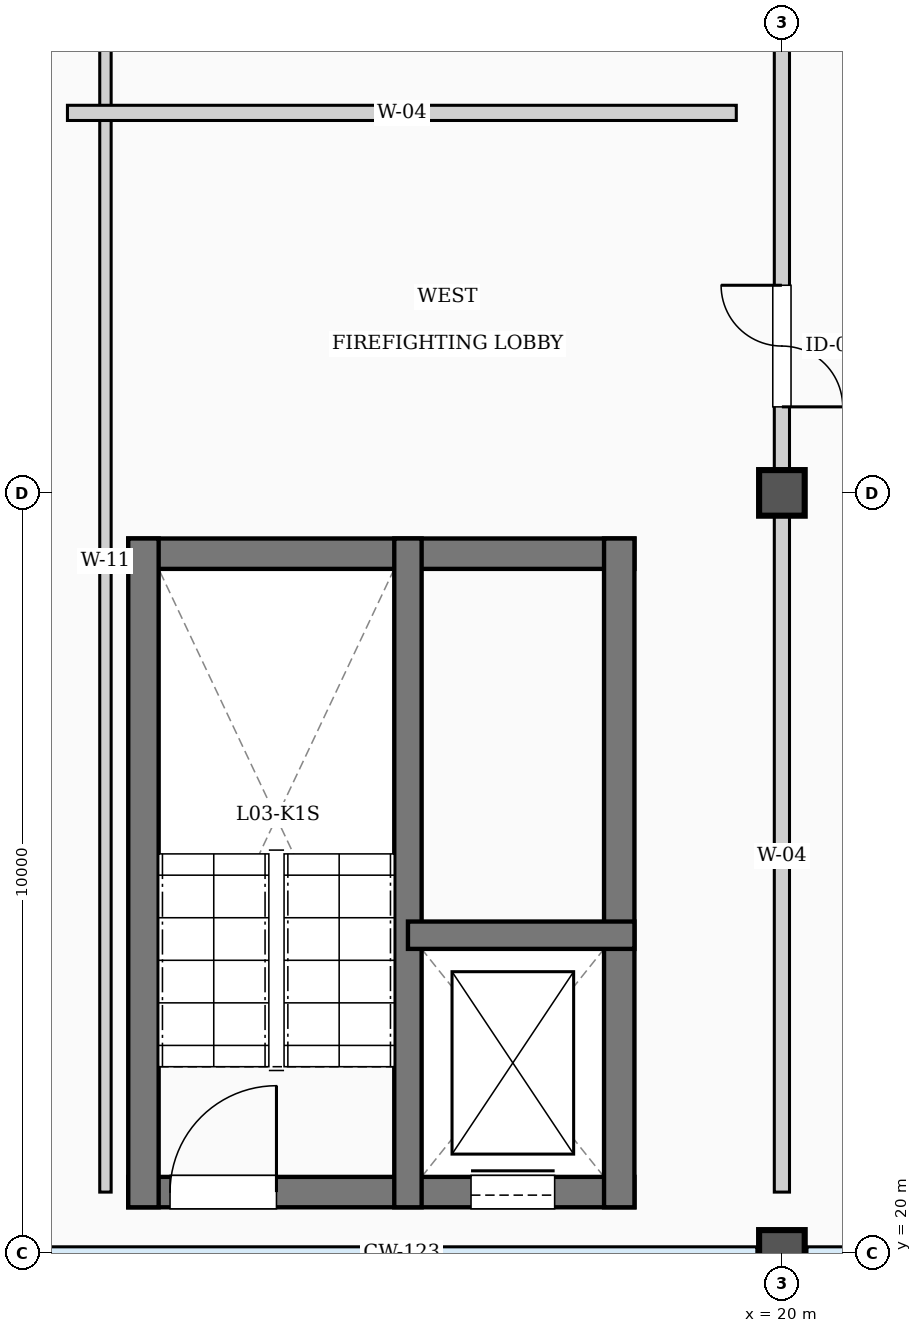
"""IFC4 building model, lengths in metres.
Left out: names, types, materials, properties, quantities, classifications, styles, units other than length and angle.
Written with IfcOpenShell. Run it as: python <this file> out.ifc"""

import sys

from ifc_helpers import new_model, si_unit, direction, frame, frame_2d, origin, origin_2d, place, context, subcontext, project, spatial, rectangle, extrude, element, fill, save


model = new_model("IFC4")
c1 = context("Model", 3, precision=1e-05, world=origin(), true_north=direction((0.0, 1.0)))
c2 = subcontext(c1, "Body", "Model", "MODEL_VIEW")
j1 = project(units=[si_unit("LENGTHUNIT", "METRE"), si_unit("PLANEANGLEUNIT", "RADIAN")], contexts=[c1])
p1 = place(None, origin())
s1 = spatial("IfcSite", under=j1, at=p1, CompositionType="ELEMENT")
p2 = place(p1, origin())
s2 = spatial("IfcBuilding", under=s1, at=p2, CompositionType="ELEMENT")
p3 = place(p2, frame((0.0, 0.0, 14.4)))
s3 = spatial("IfcBuildingStorey", under=s2, at=p3, CompositionType="ELEMENT", Elevation=14.4)
for number, where, z_axis, x_axis in (
    (1, (20.0, 20.0, 0.0), (0.0, 0.0, 1.0), (1.0, 0.0, 0.0)),
    (2, (20.0, 30.0, 0.0), (0.0, 0.0, 1.0), (1.0, 0.0, 0.0)),
):
    element("IfcColumn", number, at=place(p3, frame(where, z_axis=z_axis, x_axis=x_axis)), inside=s3, PredefinedType="COLUMN", context=c2, shape_type="SweptSolid", body=[
        extrude(rectangle(XDim=0.6, YDim=0.6, at=origin_2d()), origin(), (0.0, 0.0, 1.0), 3.9),
    ])
p4 = place(p3, frame((11.4, 20.8, 0.0), z_axis=(0.0, 0.0, 1.0), x_axis=(1.0, 0.0, 0.0)))
e3 = element("IfcWall", 3, at=p4, inside=s3, PredefinedType="SHEAR", context=c2, shape_type="SweptSolid", body=[
    extrude(rectangle(XDim=6.66, YDim=0.4, at=frame_2d((3.33, 0.0))), origin(), (0.0, 0.0, 1.0), 3.9),
])
p5 = place(p4, frame((0.55, 0.0, 0.0)))
e4 = element("IfcOpeningElement", 4, at=p5, cuts=e3, PredefinedType="OPENING", context=c2, shape_type="SweptSolid", body=[
    extrude(rectangle(XDim=1.4, YDim=2.35, at=frame_2d((0.7, 1.175))), frame((0.0, 0.21, 0.0), z_axis=(0.0, -1.0, 0.0), x_axis=(1.0, 0.0, 0.0)), (0.0, 0.0, 1.0), 0.42),
])
p6 = place(p4, frame((4.51, 0.0, 0.0)))
e5 = element("IfcOpeningElement", 5, at=p6, cuts=e3, PredefinedType="OPENING", context=c2, shape_type="SweptSolid", body=[
    extrude(rectangle(XDim=1.1, YDim=2.3, at=frame_2d((0.55, 1.15))), frame((0.0, 0.21, 0.0), z_axis=(0.0, -1.0, 0.0), x_axis=(1.0, 0.0, 0.0)), (0.0, 0.0, 1.0), 0.42),
])
p7 = place(p3, frame((11.4, 29.2, 0.0), z_axis=(0.0, 0.0, 1.0), x_axis=(1.0, 0.0, 0.0)))
e6 = element("IfcWall", 6, at=p7, inside=s3, PredefinedType="SHEAR", context=c2, shape_type="SweptSolid", body=[
    extrude(rectangle(XDim=6.66, YDim=0.4, at=frame_2d((3.33, 0.0))), origin(), (0.0, 0.0, 1.0), 3.9),
])
for number, where, z_axis, x_axis in (
    (7, (11.6, 20.6, 0.0), (0.0, 0.0, 1.0), (0.0, 1.0, 0.0)),
    (8, (17.86, 20.6, 0.0), (0.0, 0.0, 1.0), (0.0, 1.0, 0.0)),
):
    element("IfcWall", number, at=place(p3, frame(where, z_axis=z_axis, x_axis=x_axis)), inside=s3, PredefinedType="SHEAR", context=c2, shape_type="SweptSolid", body=[
        extrude(rectangle(XDim=8.8, YDim=0.4, at=frame_2d((4.4, 0.0))), origin(), (0.0, 0.0, 1.0), 3.9),
    ])
p8 = place(p3, frame((15.08, 20.6, 0.0), z_axis=(0.0, 0.0, 1.0), x_axis=(0.0, 1.0, 0.0)))
e9 = element("IfcWall", 9, at=p8, inside=s3, PredefinedType="SHEAR", context=c2, shape_type="SweptSolid", body=[
    extrude(rectangle(XDim=8.8, YDim=0.36, at=frame_2d((4.4, 0.0))), origin(), (0.0, 0.0, 1.0), 3.9),
])
p9 = place(p3, frame((15.08, 24.18, 0.0), z_axis=(0.0, 0.0, 1.0), x_axis=(1.0, 0.0, 0.0)))
e10 = element("IfcWall", 10, at=p9, inside=s3, PredefinedType="SHEAR", context=c2, shape_type="SweptSolid", body=[
    extrude(rectangle(XDim=2.98, YDim=0.36, at=frame_2d((1.49, 0.0))), origin(), (0.0, 0.0, 1.0), 3.9),
])
p10 = place(p3, frame((20.0, 20.8, 0.0), z_axis=(0.0, 0.0, 1.0), x_axis=(0.0, 1.0, 0.0)))
e11 = element("IfcWall", 11, at=p10, inside=s3, PredefinedType="PARTITIONING", context=c2, shape_type="SweptSolid", body=[
    extrude(rectangle(XDim=48.4, YDim=0.2, at=frame_2d((24.2, 0.0))), origin(), (0.0, 0.0, 1.0), 3.33),
])
p11 = place(p10, frame((10.332, 0.0, 0.0)))
e12 = element("IfcOpeningElement", 12, at=p11, cuts=e11, PredefinedType="OPENING", context=c2, shape_type="SweptSolid", body=[
    extrude(rectangle(XDim=1.6, YDim=2.4, at=frame_2d((0.8, 1.2))), frame((0.0, 0.11, 0.0), z_axis=(0.0, -1.0, 0.0), x_axis=(1.0, 0.0, 0.0)), (0.0, 0.0, 1.0), 0.22),
])
p12 = place(p10, frame((19.853, 0.0, 0.0)))
e13 = element("IfcOpeningElement", 13, at=p12, cuts=e11, PredefinedType="OPENING", context=c2, shape_type="SweptSolid", body=[
    extrude(rectangle(XDim=0.95, YDim=2.4, at=frame_2d((0.475, 1.2))), frame((0.0, 0.11, 0.0), z_axis=(0.0, -1.0, 0.0), x_axis=(1.0, 0.0, 0.0)), (0.0, 0.0, 1.0), 0.22),
])
p13 = place(p10, frame((26.095, 0.0, 0.0)))
e14 = element("IfcOpeningElement", 14, at=p13, cuts=e11, PredefinedType="OPENING", context=c2, shape_type="SweptSolid", body=[
    extrude(rectangle(XDim=1.05, YDim=2.3, at=frame_2d((0.525, 1.15))), frame((0.0, 0.11, 0.0), z_axis=(0.0, -1.0, 0.0), x_axis=(1.0, 0.0, 0.0)), (0.0, 0.0, 1.0), 0.22),
])
p14 = place(p10, frame((40.54, 0.0, 0.0)))
e15 = element("IfcOpeningElement", 15, at=p14, cuts=e11, PredefinedType="OPENING", context=c2, shape_type="SweptSolid", body=[
    extrude(rectangle(XDim=1.2, YDim=2.35, at=frame_2d((0.6, 1.175))), frame((0.0, 0.11, 0.0), z_axis=(0.0, -1.0, 0.0), x_axis=(1.0, 0.0, 0.0)), (0.0, 0.0, 1.0), 0.22),
])
p15 = place(p3, frame((11.1, 20.8, 0.0), z_axis=(0.0, 0.0, 1.0), x_axis=(0.0, 1.0, 0.0)))
e16 = element("IfcWall", 16, at=p15, inside=s3, PredefinedType="PARTITIONING", context=c2, shape_type="SweptSolid", body=[
    extrude(rectangle(XDim=38.4, YDim=0.15, at=frame_2d((19.2, 0.0))), origin(), (0.0, 0.0, 1.0), 3.56),
])
p16 = place(p15, frame((16.396, 0.0, 0.0)))
e17 = element("IfcOpeningElement", 17, at=p16, cuts=e16, PredefinedType="OPENING", context=c2, shape_type="SweptSolid", body=[
    extrude(rectangle(XDim=1.0, YDim=2.3, at=frame_2d((0.5, 1.15))), frame((0.0, 0.085, 0.0), z_axis=(0.0, -1.0, 0.0), x_axis=(1.0, 0.0, 0.0)), (0.0, 0.0, 1.0), 0.17),
])
p17 = place(p15, frame((24.435, 0.0, 0.0)))
e18 = element("IfcOpeningElement", 18, at=p17, cuts=e16, PredefinedType="OPENING", context=c2, shape_type="SweptSolid", body=[
    extrude(rectangle(XDim=1.05, YDim=2.45, at=frame_2d((0.525, 1.225))), frame((0.0, 0.085, 0.0), z_axis=(0.0, -1.0, 0.0), x_axis=(1.0, 0.0, 0.0)), (0.0, 0.0, 1.0), 0.17),
])
p18 = place(p3, frame((10.6, 35.0, 0.0), z_axis=(0.0, 0.0, 1.0), x_axis=(1.0, 0.0, 0.0)))
e19 = element("IfcWall", 19, at=p18, inside=s3, PredefinedType="PARTITIONING", context=c2, shape_type="SweptSolid", body=[
    extrude(rectangle(XDim=8.8, YDim=0.2, at=frame_2d((4.4, 0.0))), origin(), (0.0, 0.0, 1.0), 3.56),
])
p19 = place(p5, origin())
e20 = element("IfcDoor", 20, at=p19, inside=s3, OperationType="SINGLE_SWING_RIGHT", PredefinedType="DOOR", context=c2, shape_type="SweptSolid", body=[
    extrude(rectangle(XDim=1.4, YDim=2.35, at=frame_2d((0.7, 1.175))), frame((0.0, 0.025, 0.0), z_axis=(0.0, -1.0, 0.0), x_axis=(1.0, 0.0, 0.0)), (0.0, 0.0, 1.0), 0.05),
])
fill(e4, e20)
p20 = place(p6, origin())
e21 = element("IfcDoor", 21, at=p20, inside=s3, OperationType="SLIDING_TO_LEFT", PredefinedType="DOOR", context=c2, shape_type="SweptSolid", body=[
    extrude(rectangle(XDim=1.1, YDim=2.3, at=frame_2d((0.55, 1.15))), frame((0.0, 0.025, 0.0), z_axis=(0.0, -1.0, 0.0), x_axis=(1.0, 0.0, 0.0)), (0.0, 0.0, 1.0), 0.05),
])
fill(e5, e21)
p21 = place(p11, origin())
e22 = element("IfcDoor", 22, at=p21, inside=s3, OperationType="DOUBLE_DOOR_SINGLE_SWING", PredefinedType="DOOR", context=c2, shape_type="SweptSolid", body=[
    extrude(rectangle(XDim=1.6, YDim=2.4, at=frame_2d((0.8, 1.2))), frame((0.0, 0.025, 0.0), z_axis=(0.0, -1.0, 0.0), x_axis=(1.0, 0.0, 0.0)), (0.0, 0.0, 1.0), 0.05),
])
fill(e12, e22)
save(model, sys.argv[1])
